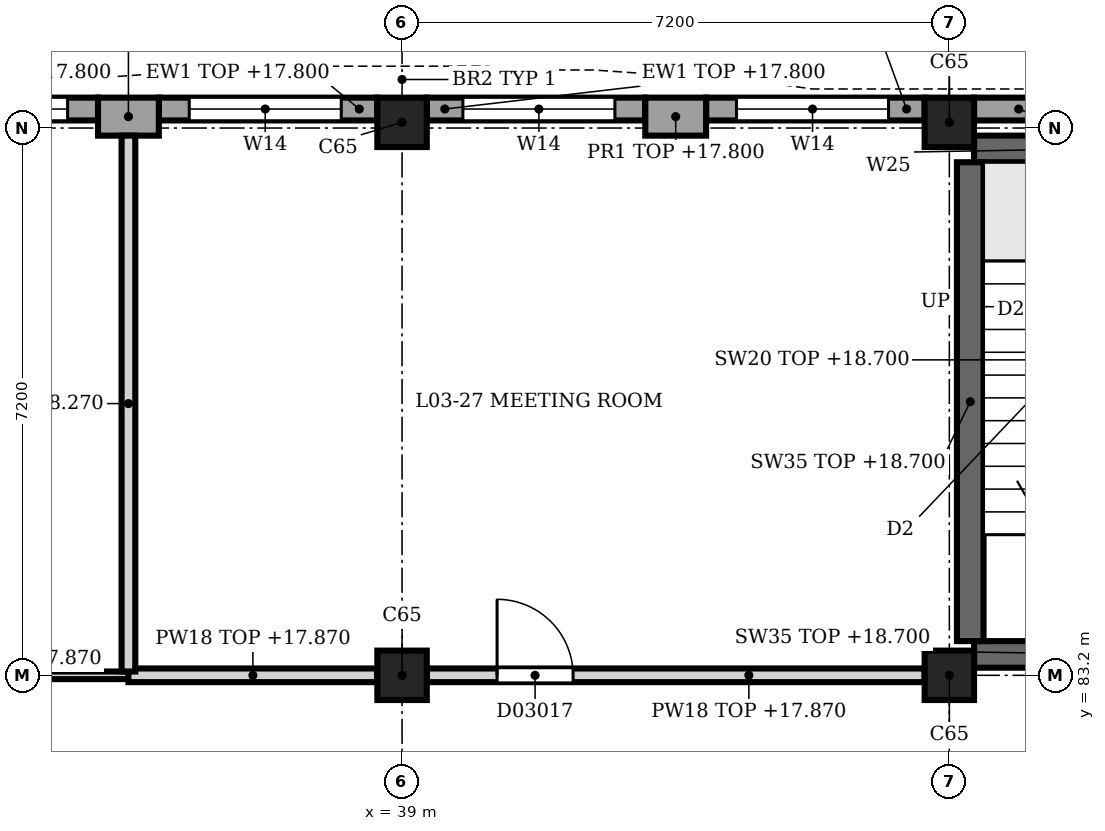
"""IFC4 building model, lengths in metres.
Left out: names, types, materials, properties, quantities, classifications, styles, units other than length and angle.
Written with IfcOpenShell. Run it as: python <this file> out.ifc"""

import sys

from ifc_helpers import new_model, si_unit, direction, frame, frame_2d, origin, origin_2d, place, context, subcontext, project, spatial, rectangle, extrude, element, fill, save


model = new_model("IFC4")
c1 = context("Model", 3, precision=1e-05, world=origin(), true_north=direction((0.0, 1.0)))
c2 = subcontext(c1, "Body", "Model", "MODEL_VIEW")
j1 = project(units=[si_unit("LENGTHUNIT", "METRE"), si_unit("PLANEANGLEUNIT", "RADIAN")], contexts=[c1])
p1 = place(None, origin())
s1 = spatial("IfcSite", under=j1, at=p1, CompositionType="ELEMENT")
p2 = place(p1, origin())
s2 = spatial("IfcBuilding", under=s1, at=p2, CompositionType="ELEMENT")
p3 = place(p2, frame((0.0, 0.0, 14.4)))
s3 = spatial("IfcBuildingStorey", under=s2, at=p3, CompositionType="ELEMENT", Elevation=14.4)
for number, where, z_axis, x_axis in (
    (1, (39.0, 83.2, 0.0), (0.0, 0.0, 1.0), (1.0, 0.0, 0.0)),
    (2, (39.0, 90.475, 0.0), (0.0, 0.0, 1.0), (1.0, 0.0, 0.0)),
    (3, (46.2, 83.2, 0.0), (0.0, 0.0, 1.0), (1.0, 0.0, 0.0)),
    (4, (46.2, 90.475, 0.0), (0.0, 0.0, 1.0), (1.0, 0.0, 0.0)),
):
    element("IfcColumn", number, at=place(p3, frame(where, z_axis=z_axis, x_axis=x_axis)), inside=s3, PredefinedType="COLUMN", context=c2, shape_type="SweptSolid", body=[
        extrude(rectangle(XDim=0.65, YDim=0.65, at=origin_2d()), origin(), (0.0, 0.0, 1.0), 4.5),
    ])
for number, where, z_axis, x_axis in (
    (5, (35.0, 90.55, 0.0), (0.0, 0.0, 1.0), (1.0, 0.0, 0.0)),
    (6, (42.2, 90.55, 0.0), (0.0, 0.0, 1.0), (1.0, 0.0, 0.0)),
):
    element("IfcWall", number, at=place(p3, frame(where, z_axis=z_axis, x_axis=x_axis)), inside=s3, PredefinedType="SOLIDWALL", context=c2, shape_type="SweptSolid", body=[
        extrude(rectangle(XDim=0.8, YDim=0.5, at=frame_2d((0.4, 0.0))), origin(), (0.0, 0.0, 1.0), 3.4),
    ])
p4 = place(p3, frame((32.125, 90.65, 0.0), z_axis=(0.0, 0.0, 1.0), x_axis=(1.0, 0.0, 0.0)))
e7 = element("IfcWall", 7, at=p4, inside=s3, PredefinedType="SOLIDWALL", context=c2, shape_type="SweptSolid", body=[
    extrude(rectangle(XDim=2.875, YDim=0.3, at=frame_2d((1.438, 0.0))), origin(), (0.0, 0.0, 1.0), 3.4),
])
p5 = place(p4, frame((0.475, 0.0, 0.9)))
e8 = element("IfcOpeningElement", 8, at=p5, cuts=e7, PredefinedType="OPENING", context=c2, shape_type="SweptSolid", body=[
    extrude(rectangle(XDim=2.0, YDim=2.4, at=frame_2d((1.0, 1.2))), frame((0.0, 0.16, 0.0), z_axis=(0.0, -1.0, 0.0), x_axis=(1.0, 0.0, 0.0)), (0.0, 0.0, 1.0), 0.32),
])
p6 = place(p3, frame((35.8, 90.65, 0.0), z_axis=(0.0, 0.0, 1.0), x_axis=(1.0, 0.0, 0.0)))
e9 = element("IfcWall", 9, at=p6, inside=s3, PredefinedType="SOLIDWALL", context=c2, shape_type="SweptSolid", body=[
    extrude(rectangle(XDim=2.875, YDim=0.3, at=frame_2d((1.438, 0.0))), origin(), (0.0, 0.0, 1.0), 3.4),
])
p7 = place(p6, frame((0.4, 0.0, 0.9)))
e10 = element("IfcOpeningElement", 10, at=p7, cuts=e9, PredefinedType="OPENING", context=c2, shape_type="SweptSolid", body=[
    extrude(rectangle(XDim=2.0, YDim=2.4, at=frame_2d((1.0, 1.2))), frame((0.0, 0.16, 0.0), z_axis=(0.0, -1.0, 0.0), x_axis=(1.0, 0.0, 0.0)), (0.0, 0.0, 1.0), 0.32),
])
p8 = place(p3, frame((39.325, 90.65, 0.0), z_axis=(0.0, 0.0, 1.0), x_axis=(1.0, 0.0, 0.0)))
e11 = element("IfcWall", 11, at=p8, inside=s3, PredefinedType="SOLIDWALL", context=c2, shape_type="SweptSolid", body=[
    extrude(rectangle(XDim=2.875, YDim=0.3, at=frame_2d((1.438, 0.0))), origin(), (0.0, 0.0, 1.0), 3.4),
])
p9 = place(p8, frame((0.475, 0.0, 0.9)))
e12 = element("IfcOpeningElement", 12, at=p9, cuts=e11, PredefinedType="OPENING", context=c2, shape_type="SweptSolid", body=[
    extrude(rectangle(XDim=2.0, YDim=2.4, at=frame_2d((1.0, 1.2))), frame((0.0, 0.16, 0.0), z_axis=(0.0, -1.0, 0.0), x_axis=(1.0, 0.0, 0.0)), (0.0, 0.0, 1.0), 0.32),
])
p10 = place(p3, frame((43.0, 90.65, 0.0), z_axis=(0.0, 0.0, 1.0), x_axis=(1.0, 0.0, 0.0)))
e13 = element("IfcWall", 13, at=p10, inside=s3, PredefinedType="SOLIDWALL", context=c2, shape_type="SweptSolid", body=[
    extrude(rectangle(XDim=2.875, YDim=0.3, at=frame_2d((1.438, 0.0))), origin(), (0.0, 0.0, 1.0), 3.4),
])
p11 = place(p10, frame((0.4, 0.0, 0.9)))
e14 = element("IfcOpeningElement", 14, at=p11, cuts=e13, PredefinedType="OPENING", context=c2, shape_type="SweptSolid", body=[
    extrude(rectangle(XDim=2.0, YDim=2.4, at=frame_2d((1.0, 1.2))), frame((0.0, 0.16, 0.0), z_axis=(0.0, -1.0, 0.0), x_axis=(1.0, 0.0, 0.0)), (0.0, 0.0, 1.0), 0.32),
])
p12 = place(p3, frame((46.525, 90.65, 0.0), z_axis=(0.0, 0.0, 1.0), x_axis=(1.0, 0.0, 0.0)))
e15 = element("IfcWall", 15, at=p12, inside=s3, PredefinedType="SOLIDWALL", context=c2, shape_type="SweptSolid", body=[
    extrude(rectangle(XDim=2.875, YDim=0.3, at=frame_2d((1.438, 0.0))), origin(), (0.0, 0.0, 1.0), 3.4),
])
p13 = place(p12, frame((1.175, 0.0, 1.2)))
e16 = element("IfcOpeningElement", 16, at=p13, cuts=e15, PredefinedType="OPENING", context=c2, shape_type="SweptSolid", body=[
    extrude(rectangle(XDim=0.6, YDim=1.8, at=frame_2d((0.3, 0.9))), frame((0.0, 0.16, 0.0), z_axis=(0.0, -1.0, 0.0), x_axis=(1.0, 0.0, 0.0)), (0.0, 0.0, 1.0), 0.32),
])
p14 = place(p3, frame((46.525, 83.475, 0.0), z_axis=(0.0, 0.0, 1.0), x_axis=(1.0, 0.0, 0.0)))
e17 = element("IfcWall", 17, at=p14, inside=s3, PredefinedType="SHEAR", context=c2, shape_type="SweptSolid", body=[
    extrude(rectangle(XDim=6.55, YDim=0.35, at=frame_2d((3.275, 0.0))), origin(), (0.0, 0.0, 1.0), 4.3),
])
p15 = place(p14, frame((3.875, 0.0, 0.0)))
e18 = element("IfcOpeningElement", 18, at=p15, cuts=e17, PredefinedType="OPENING", context=c2, shape_type="SweptSolid", body=[
    extrude(rectangle(XDim=1.2, YDim=2.1, at=frame_2d((0.6, 1.05))), frame((0.0, 0.185, 0.0), z_axis=(0.0, -1.0, 0.0), x_axis=(1.0, 0.0, 0.0)), (0.0, 0.0, 1.0), 0.37),
])
p16 = place(p3, frame((46.525, 90.125, 0.0), z_axis=(0.0, 0.0, 1.0), x_axis=(1.0, 0.0, 0.0)))
e19 = element("IfcWall", 19, at=p16, inside=s3, PredefinedType="SHEAR", context=c2, shape_type="SweptSolid", body=[
    extrude(rectangle(XDim=6.55, YDim=0.35, at=frame_2d((3.275, 0.0))), origin(), (0.0, 0.0, 1.0), 4.3),
])
p17 = place(p16, frame((1.175, 0.0, 1.2)))
e20 = element("IfcOpeningElement", 20, at=p17, cuts=e19, PredefinedType="OPENING", context=c2, shape_type="SweptSolid", body=[
    extrude(rectangle(XDim=0.6, YDim=1.8, at=frame_2d((0.3, 0.9))), frame((0.0, 0.185, 0.0), z_axis=(0.0, -1.0, 0.0), x_axis=(1.0, 0.0, 0.0)), (0.0, 0.0, 1.0), 0.37),
])
p18 = place(p3, frame((46.475, 83.65, 0.0), z_axis=(0.0, 0.0, 1.0), x_axis=(0.0, 1.0, 0.0)))
e21 = element("IfcWall", 21, at=p18, inside=s3, PredefinedType="SHEAR", context=c2, shape_type="SweptSolid", body=[
    extrude(rectangle(XDim=6.3, YDim=0.35, at=frame_2d((3.15, 0.0))), origin(), (0.0, 0.0, 1.0), 4.3),
])
p19 = place(p3, frame((32.125, 83.2, 0.0), z_axis=(0.0, 0.0, 1.0), x_axis=(1.0, 0.0, 0.0)))
e22 = element("IfcWall", 22, at=p19, inside=s3, PredefinedType="PARTITIONING", context=c2, shape_type="SweptSolid", body=[
    extrude(rectangle(XDim=3.275, YDim=0.1, at=frame_2d((1.637, 0.0))), origin(), (0.0, 0.0, 1.0), 3.47),
])
p20 = place(p3, frame((35.4, 83.2, 0.0), z_axis=(0.0, 0.0, 1.0), x_axis=(1.0, 0.0, 0.0)))
e23 = element("IfcWall", 23, at=p20, inside=s3, PredefinedType="PARTITIONING", context=c2, shape_type="SweptSolid", body=[
    extrude(rectangle(XDim=3.275, YDim=0.18, at=frame_2d((1.638, 0.0))), origin(), (0.0, 0.0, 1.0), 3.47),
])
p21 = place(p3, frame((39.325, 83.2, 0.0), z_axis=(0.0, 0.0, 1.0), x_axis=(1.0, 0.0, 0.0)))
e24 = element("IfcWall", 24, at=p21, inside=s3, PredefinedType="PARTITIONING", context=c2, shape_type="SweptSolid", body=[
    extrude(rectangle(XDim=6.55, YDim=0.18, at=frame_2d((3.275, 0.0))), origin(), (0.0, 0.0, 1.0), 3.47),
])
p22 = place(p21, frame((0.925, 0.0, 0.0)))
e25 = element("IfcOpeningElement", 25, at=p22, cuts=e24, PredefinedType="OPENING", context=c2, shape_type="SweptSolid", body=[
    extrude(rectangle(XDim=1.0, YDim=2.1, at=frame_2d((0.5, 1.05))), frame((0.0, 0.1, 0.0), z_axis=(0.0, -1.0, 0.0), x_axis=(1.0, 0.0, 0.0)), (0.0, 0.0, 1.0), 0.2),
])
p23 = place(p3, frame((35.4, 83.25, 0.0), z_axis=(0.0, 0.0, 1.0), x_axis=(0.0, 1.0, 0.0)))
e26 = element("IfcWall", 26, at=p23, inside=s3, PredefinedType="PARTITIONING", context=c2, shape_type="SweptSolid", body=[
    extrude(rectangle(XDim=7.05, YDim=0.18, at=frame_2d((3.525, 0.0))), origin(), (0.0, 0.0, 1.0), 3.87),
])
p24 = place(p5, origin())
e27 = element("IfcWindow", 27, at=p24, inside=s3, PartitioningType="SINGLE_PANEL", PredefinedType="WINDOW", context=c2, shape_type="SweptSolid", body=[
    extrude(rectangle(XDim=2.0, YDim=2.4, at=frame_2d((1.0, 1.2))), frame((0.0, 0.03, 0.0), z_axis=(0.0, -1.0, 0.0), x_axis=(1.0, 0.0, 0.0)), (0.0, 0.0, 1.0), 0.06),
])
fill(e8, e27)
p25 = place(p7, origin())
e28 = element("IfcWindow", 28, at=p25, inside=s3, PartitioningType="SINGLE_PANEL", PredefinedType="WINDOW", context=c2, shape_type="SweptSolid", body=[
    extrude(rectangle(XDim=2.0, YDim=2.4, at=frame_2d((1.0, 1.2))), frame((0.0, 0.03, 0.0), z_axis=(0.0, -1.0, 0.0), x_axis=(1.0, 0.0, 0.0)), (0.0, 0.0, 1.0), 0.06),
])
fill(e10, e28)
p26 = place(p9, origin())
e29 = element("IfcWindow", 29, at=p26, inside=s3, PartitioningType="SINGLE_PANEL", PredefinedType="WINDOW", context=c2, shape_type="SweptSolid", body=[
    extrude(rectangle(XDim=2.0, YDim=2.4, at=frame_2d((1.0, 1.2))), frame((0.0, 0.03, 0.0), z_axis=(0.0, -1.0, 0.0), x_axis=(1.0, 0.0, 0.0)), (0.0, 0.0, 1.0), 0.06),
])
fill(e12, e29)
p27 = place(p11, origin())
e30 = element("IfcWindow", 30, at=p27, inside=s3, PartitioningType="SINGLE_PANEL", PredefinedType="WINDOW", context=c2, shape_type="SweptSolid", body=[
    extrude(rectangle(XDim=2.0, YDim=2.4, at=frame_2d((1.0, 1.2))), frame((0.0, 0.03, 0.0), z_axis=(0.0, -1.0, 0.0), x_axis=(1.0, 0.0, 0.0)), (0.0, 0.0, 1.0), 0.06),
])
fill(e14, e30)
p28 = place(p22, origin())
e31 = element("IfcDoor", 31, at=p28, inside=s3, OperationType="SINGLE_SWING_LEFT", PredefinedType="DOOR", context=c2, shape_type="SweptSolid", body=[
    extrude(rectangle(XDim=1.0, YDim=2.1, at=frame_2d((0.5, 1.05))), frame((0.0, 0.025, 0.0), z_axis=(0.0, -1.0, 0.0), x_axis=(1.0, 0.0, 0.0)), (0.0, 0.0, 1.0), 0.05),
])
fill(e25, e31)
save(model, sys.argv[1])
